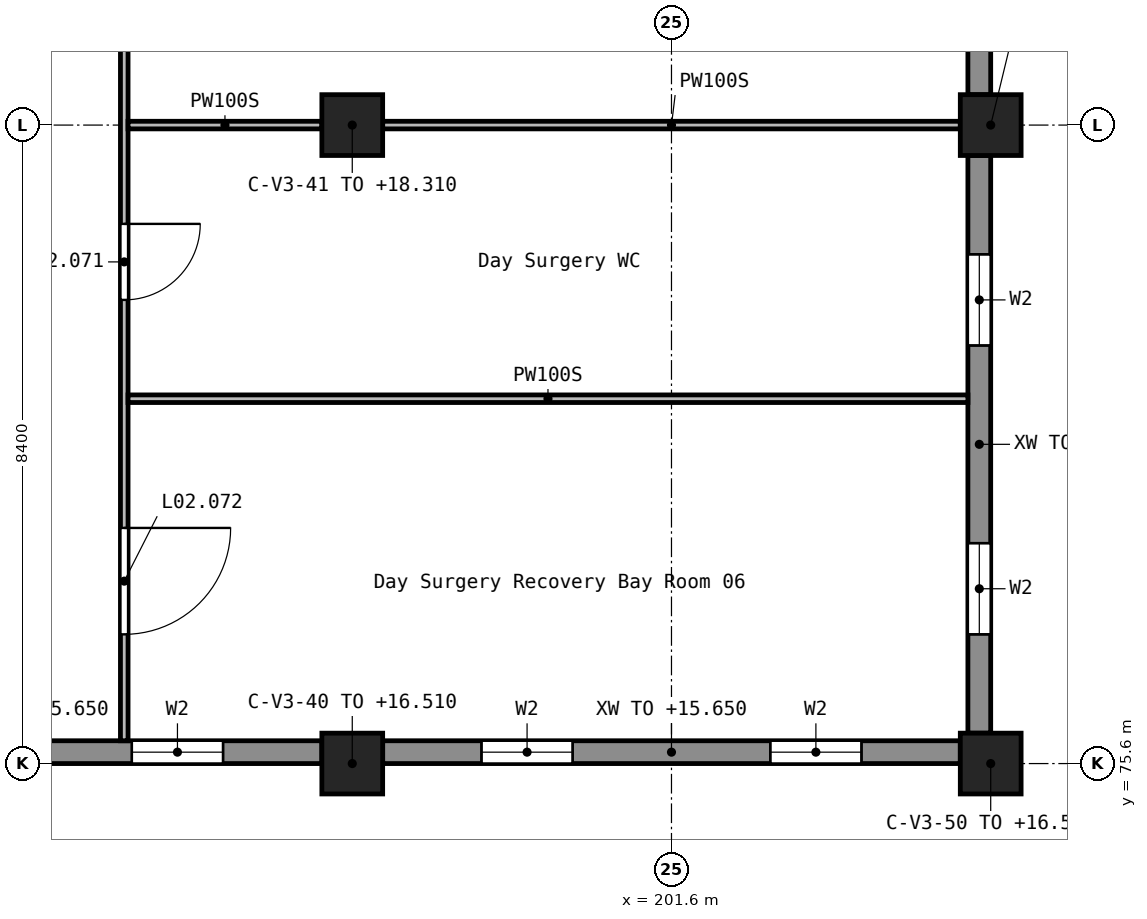
"""IFC4 building model, lengths in metres.
Left out: names, types, materials, properties, quantities, classifications, styles, units other than length and angle.
Written with IfcOpenShell. Run it as: python <this file> out.ifc"""

import sys

from ifc_helpers import new_model, si_unit, direction, frame, frame_2d, origin, origin_2d, place, context, subcontext, project, spatial, rectangle, extrude, element, fill, save


model = new_model("IFC4")
c1 = context("Model", 3, precision=1e-05, world=origin(), true_north=direction((0.0, 1.0)))
c2 = subcontext(c1, "Body", "Model", "MODEL_VIEW")
j1 = project(units=[si_unit("LENGTHUNIT", "METRE"), si_unit("PLANEANGLEUNIT", "RADIAN")], contexts=[c1])
p1 = place(None, origin())
s1 = spatial("IfcSite", under=j1, at=p1, CompositionType="ELEMENT")
p2 = place(p1, origin())
s2 = spatial("IfcBuilding", under=s1, at=p2, CompositionType="ELEMENT")
p3 = place(p2, frame((0.0, 0.0, 12.6)))
s3 = spatial("IfcBuildingStorey", under=s2, at=p3, CompositionType="ELEMENT", Elevation=12.6)
p4 = place(p3, frame((197.4, 75.6, 0.0), z_axis=(0.0, 0.0, 1.0), x_axis=(1.0, 0.0, 0.0)))
e1 = element("IfcColumn", 1, at=p4, inside=s3, PredefinedType="COLUMN", context=c2, shape_type="SweptSolid", body=[
    extrude(rectangle(XDim=0.8, YDim=0.8, at=origin_2d()), origin(), (0.0, 0.0, 1.0), 3.91),
])
p5 = place(p3, frame((197.4, 84.0, 0.0), z_axis=(0.0, 0.0, 1.0), x_axis=(1.0, 0.0, 0.0)))
e2 = element("IfcColumn", 2, at=p5, inside=s3, PredefinedType="COLUMN", context=c2, shape_type="SweptSolid", body=[
    extrude(rectangle(XDim=0.8, YDim=0.8, at=origin_2d()), origin(), (0.0, 0.0, 1.0), 5.71),
])
p6 = place(p3, frame((205.8, 75.6, 0.0), z_axis=(0.0, 0.0, 1.0), x_axis=(1.0, 0.0, 0.0)))
e3 = element("IfcColumn", 3, at=p6, inside=s3, PredefinedType="COLUMN", context=c2, shape_type="SweptSolid", body=[
    extrude(rectangle(XDim=0.8, YDim=0.8, at=origin_2d()), origin(), (0.0, 0.0, 1.0), 3.91),
])
p7 = place(p3, frame((205.8, 84.0, 0.0), z_axis=(0.0, 0.0, 1.0), x_axis=(1.0, 0.0, 0.0)))
e4 = element("IfcColumn", 4, at=p7, inside=s3, PredefinedType="COLUMN", context=c2, shape_type="SweptSolid", body=[
    extrude(rectangle(XDim=0.8, YDim=0.8, at=origin_2d()), origin(), (0.0, 0.0, 1.0), 5.71),
])
p8 = place(p3, frame((189.4, 75.75, 0.0), z_axis=(0.0, 0.0, 1.0), x_axis=(1.0, 0.0, 0.0)))
e5 = element("IfcWall", 5, at=p8, inside=s3, PredefinedType="STANDARD", context=c2, shape_type="SweptSolid", body=[
    extrude(rectangle(XDim=7.6, YDim=0.3, at=frame_2d((3.8, 0.0))), origin(), (0.0, 0.0, 1.0), 3.05),
])
p9 = place(p8, frame((0.65, 0.0, 1.2)))
e6 = element("IfcOpeningElement", 6, at=p9, cuts=e5, PredefinedType="OPENING", context=c2, shape_type="SweptSolid", body=[
    extrude(rectangle(XDim=1.2, YDim=1.2, at=frame_2d((0.6, 0.6))), frame((0.0, 0.16, 0.0), z_axis=(0.0, -1.0, 0.0), x_axis=(1.0, 0.0, 0.0)), (0.0, 0.0, 1.0), 0.32),
])
p10 = place(p8, frame((5.1, 0.0, 1.2)))
e7 = element("IfcOpeningElement", 7, at=p10, cuts=e5, PredefinedType="OPENING", context=c2, shape_type="SweptSolid", body=[
    extrude(rectangle(XDim=1.2, YDim=1.2, at=frame_2d((0.6, 0.6))), frame((0.0, 0.16, 0.0), z_axis=(0.0, -1.0, 0.0), x_axis=(1.0, 0.0, 0.0)), (0.0, 0.0, 1.0), 0.32),
])
p11 = place(p3, frame((197.8, 75.75, 0.0), z_axis=(0.0, 0.0, 1.0), x_axis=(1.0, 0.0, 0.0)))
e8 = element("IfcWall", 8, at=p11, inside=s3, PredefinedType="STANDARD", context=c2, shape_type="SweptSolid", body=[
    extrude(rectangle(XDim=7.6, YDim=0.3, at=frame_2d((3.8, 0.0))), origin(), (0.0, 0.0, 1.0), 3.05),
])
p12 = place(p11, frame((1.3, 0.0, 1.2)))
e9 = element("IfcOpeningElement", 9, at=p12, cuts=e8, PredefinedType="OPENING", context=c2, shape_type="SweptSolid", body=[
    extrude(rectangle(XDim=1.2, YDim=1.2, at=frame_2d((0.6, 0.6))), frame((0.0, 0.16, 0.0), z_axis=(0.0, -1.0, 0.0), x_axis=(1.0, 0.0, 0.0)), (0.0, 0.0, 1.0), 0.32),
])
p13 = place(p11, frame((5.1, 0.0, 1.2)))
e10 = element("IfcOpeningElement", 10, at=p13, cuts=e8, PredefinedType="OPENING", context=c2, shape_type="SweptSolid", body=[
    extrude(rectangle(XDim=1.2, YDim=1.2, at=frame_2d((0.6, 0.6))), frame((0.0, 0.16, 0.0), z_axis=(0.0, -1.0, 0.0), x_axis=(1.0, 0.0, 0.0)), (0.0, 0.0, 1.0), 0.32),
])
p14 = place(p3, frame((205.65, 76.0, 0.0), z_axis=(0.0, 0.0, 1.0), x_axis=(0.0, 1.0, 0.0)))
e11 = element("IfcWall", 11, at=p14, inside=s3, PredefinedType="STANDARD", context=c2, shape_type="SweptSolid", body=[
    extrude(rectangle(XDim=7.6, YDim=0.3, at=frame_2d((3.8, 0.0))), origin(), (0.0, 0.0, 1.0), 3.05),
])
p15 = place(p14, frame((1.3, 0.0, 1.2)))
e12 = element("IfcOpeningElement", 12, at=p15, cuts=e11, PredefinedType="OPENING", context=c2, shape_type="SweptSolid", body=[
    extrude(rectangle(XDim=1.2, YDim=1.2, at=frame_2d((0.6, 0.6))), frame((0.0, 0.16, 0.0), z_axis=(0.0, -1.0, 0.0), x_axis=(1.0, 0.0, 0.0)), (0.0, 0.0, 1.0), 0.32),
])
p16 = place(p14, frame((5.1, 0.0, 1.2)))
e13 = element("IfcOpeningElement", 13, at=p16, cuts=e11, PredefinedType="OPENING", context=c2, shape_type="SweptSolid", body=[
    extrude(rectangle(XDim=1.2, YDim=1.2, at=frame_2d((0.6, 0.6))), frame((0.0, 0.16, 0.0), z_axis=(0.0, -1.0, 0.0), x_axis=(1.0, 0.0, 0.0)), (0.0, 0.0, 1.0), 0.32),
])
p17 = place(p3, frame((205.65, 84.4, 0.0), z_axis=(0.0, 0.0, 1.0), x_axis=(0.0, 1.0, 0.0)))
e14 = element("IfcWall", 14, at=p17, inside=s3, PredefinedType="STANDARD", context=c2, shape_type="SweptSolid", body=[
    extrude(rectangle(XDim=7.6, YDim=0.3, at=frame_2d((3.8, 0.0))), origin(), (0.0, 0.0, 1.0), 3.05),
])
p18 = place(p17, frame((1.3, 0.0, 1.2)))
e15 = element("IfcOpeningElement", 15, at=p18, cuts=e14, PredefinedType="OPENING", context=c2, shape_type="SweptSolid", body=[
    extrude(rectangle(XDim=1.2, YDim=1.2, at=frame_2d((0.6, 0.6))), frame((0.0, 0.16, 0.0), z_axis=(0.0, -1.0, 0.0), x_axis=(1.0, 0.0, 0.0)), (0.0, 0.0, 1.0), 0.32),
])
p19 = place(p17, frame((5.1, 0.0, 1.2)))
e16 = element("IfcOpeningElement", 16, at=p19, cuts=e14, PredefinedType="OPENING", context=c2, shape_type="SweptSolid", body=[
    extrude(rectangle(XDim=1.2, YDim=1.2, at=frame_2d((0.6, 0.6))), frame((0.0, 0.16, 0.0), z_axis=(0.0, -1.0, 0.0), x_axis=(1.0, 0.0, 0.0)), (0.0, 0.0, 1.0), 0.32),
])
p20 = place(p3, frame((194.4, 94.25, 0.0), z_axis=(0.0, 0.0, 1.0), x_axis=(0.0, -1.0, 0.0)))
e17 = element("IfcWall", 17, at=p20, inside=s3, PredefinedType="PARTITIONING", context=c2, shape_type="SweptSolid", body=[
    extrude(rectangle(XDim=18.35, YDim=0.1, at=frame_2d((9.175, 0.0))), origin(), (0.0, 0.0, 1.0), 3.79),
])
p21 = place(p20, frame((0.5, 0.0, 0.0)))
e18 = element("IfcOpeningElement", 18, at=p21, cuts=e17, PredefinedType="OPENING", context=c2, shape_type="SweptSolid", body=[
    extrude(rectangle(XDim=0.9, YDim=2.1, at=frame_2d((0.45, 1.05))), frame((0.0, 0.06, 0.0), z_axis=(0.0, -1.0, 0.0), x_axis=(1.0, 0.0, 0.0)), (0.0, 0.0, 1.0), 0.12),
])
p22 = place(p20, frame((3.25, 0.0, 0.0)))
e19 = element("IfcOpeningElement", 19, at=p22, cuts=e17, PredefinedType="OPENING", context=c2, shape_type="SweptSolid", body=[
    extrude(rectangle(XDim=1.4, YDim=2.1, at=frame_2d((0.7, 1.05))), frame((0.0, 0.06, 0.0), z_axis=(0.0, -1.0, 0.0), x_axis=(1.0, 0.0, 0.0)), (0.0, 0.0, 1.0), 0.12),
])
p23 = place(p20, frame((7.7, 0.0, 0.0)))
e20 = element("IfcOpeningElement", 20, at=p23, cuts=e17, PredefinedType="OPENING", context=c2, shape_type="SweptSolid", body=[
    extrude(rectangle(XDim=0.9, YDim=2.1, at=frame_2d((0.45, 1.05))), frame((0.0, 0.06, 0.0), z_axis=(0.0, -1.0, 0.0), x_axis=(1.0, 0.0, 0.0)), (0.0, 0.0, 1.0), 0.12),
])
p24 = place(p20, frame((11.55, 0.0, 0.0)))
e21 = element("IfcOpeningElement", 21, at=p24, cuts=e17, PredefinedType="OPENING", context=c2, shape_type="SweptSolid", body=[
    extrude(rectangle(XDim=1.0, YDim=2.1, at=frame_2d((0.5, 1.05))), frame((0.0, 0.06, 0.0), z_axis=(0.0, -1.0, 0.0), x_axis=(1.0, 0.0, 0.0)), (0.0, 0.0, 1.0), 0.12),
])
p25 = place(p20, frame((15.55, 0.0, 0.0)))
e22 = element("IfcOpeningElement", 22, at=p25, cuts=e17, PredefinedType="OPENING", context=c2, shape_type="SweptSolid", body=[
    extrude(rectangle(XDim=1.4, YDim=2.1, at=frame_2d((0.7, 1.05))), frame((0.0, 0.06, 0.0), z_axis=(0.0, -1.0, 0.0), x_axis=(1.0, 0.0, 0.0)), (0.0, 0.0, 1.0), 0.12),
])
p26 = place(p3, frame((194.45, 80.4, 0.0), z_axis=(0.0, 0.0, 1.0), x_axis=(1.0, 0.0, 0.0)))
e23 = element("IfcWall", 23, at=p26, inside=s3, PredefinedType="PARTITIONING", context=c2, shape_type="SweptSolid", body=[
    extrude(rectangle(XDim=11.05, YDim=0.1, at=frame_2d((5.525, 0.0))), origin(), (0.0, 0.0, 1.0), 3.85),
])
p27 = place(p3, frame((194.45, 84.0, 0.0), z_axis=(0.0, 0.0, 1.0), x_axis=(1.0, 0.0, 0.0)))
e24 = element("IfcWall", 24, at=p27, inside=s3, PredefinedType="PARTITIONING", context=c2, shape_type="SweptSolid", body=[
    extrude(rectangle(XDim=2.55, YDim=0.1, at=frame_2d((1.275, 0.0))), origin(), (0.0, 0.0, 1.0), 3.85),
])
p28 = place(p3, frame((197.8, 84.0, 0.0), z_axis=(0.0, 0.0, 1.0), x_axis=(1.0, 0.0, 0.0)))
e25 = element("IfcWall", 25, at=p28, inside=s3, PredefinedType="PARTITIONING", context=c2, shape_type="SweptSolid", body=[
    extrude(rectangle(XDim=7.6, YDim=0.1, at=frame_2d((3.8, 0.0))), origin(), (0.0, 0.0, 1.0), 3.85),
])
p29 = place(p10, origin())
e26 = element("IfcWindow", 26, at=p29, inside=s3, PartitioningType="SINGLE_PANEL", PredefinedType="WINDOW", context=c2, shape_type="SweptSolid", body=[
    extrude(rectangle(XDim=1.2, YDim=1.2, at=frame_2d((0.6, 0.6))), frame((0.0, 0.03, 0.0), z_axis=(0.0, -1.0, 0.0), x_axis=(1.0, 0.0, 0.0)), (0.0, 0.0, 1.0), 0.06),
])
fill(e7, e26)
p30 = place(p12, origin())
e27 = element("IfcWindow", 27, at=p30, inside=s3, PartitioningType="SINGLE_PANEL", PredefinedType="WINDOW", context=c2, shape_type="SweptSolid", body=[
    extrude(rectangle(XDim=1.2, YDim=1.2, at=frame_2d((0.6, 0.6))), frame((0.0, 0.03, 0.0), z_axis=(0.0, -1.0, 0.0), x_axis=(1.0, 0.0, 0.0)), (0.0, 0.0, 1.0), 0.06),
])
fill(e9, e27)
p31 = place(p13, origin())
e28 = element("IfcWindow", 28, at=p31, inside=s3, PartitioningType="SINGLE_PANEL", PredefinedType="WINDOW", context=c2, shape_type="SweptSolid", body=[
    extrude(rectangle(XDim=1.2, YDim=1.2, at=frame_2d((0.6, 0.6))), frame((0.0, 0.03, 0.0), z_axis=(0.0, -1.0, 0.0), x_axis=(1.0, 0.0, 0.0)), (0.0, 0.0, 1.0), 0.06),
])
fill(e10, e28)
p32 = place(p15, origin())
e29 = element("IfcWindow", 29, at=p32, inside=s3, PartitioningType="SINGLE_PANEL", PredefinedType="WINDOW", context=c2, shape_type="SweptSolid", body=[
    extrude(rectangle(XDim=1.2, YDim=1.2, at=frame_2d((0.6, 0.6))), frame((0.0, 0.03, 0.0), z_axis=(0.0, -1.0, 0.0), x_axis=(1.0, 0.0, 0.0)), (0.0, 0.0, 1.0), 0.06),
])
fill(e12, e29)
p33 = place(p16, origin())
e30 = element("IfcWindow", 30, at=p33, inside=s3, PartitioningType="SINGLE_PANEL", PredefinedType="WINDOW", context=c2, shape_type="SweptSolid", body=[
    extrude(rectangle(XDim=1.2, YDim=1.2, at=frame_2d((0.6, 0.6))), frame((0.0, 0.03, 0.0), z_axis=(0.0, -1.0, 0.0), x_axis=(1.0, 0.0, 0.0)), (0.0, 0.0, 1.0), 0.06),
])
fill(e13, e30)
p34 = place(p24, origin())
e31 = element("IfcDoor", 31, at=p34, inside=s3, OperationType="SINGLE_SWING_RIGHT", PredefinedType="DOOR", context=c2, shape_type="SweptSolid", body=[
    extrude(rectangle(XDim=1.0, YDim=2.1, at=frame_2d((0.5, 1.05))), frame((0.0, 0.025, 0.0), z_axis=(0.0, -1.0, 0.0), x_axis=(1.0, 0.0, 0.0)), (0.0, 0.0, 1.0), 0.05),
])
fill(e21, e31)
p35 = place(p25, origin())
e32 = element("IfcDoor", 32, at=p35, inside=s3, OperationType="DOUBLE_DOOR_SINGLE_SWING", PredefinedType="DOOR", context=c2, shape_type="SweptSolid", body=[
    extrude(rectangle(XDim=1.4, YDim=2.1, at=frame_2d((0.7, 1.05))), frame((0.0, 0.025, 0.0), z_axis=(0.0, -1.0, 0.0), x_axis=(1.0, 0.0, 0.0)), (0.0, 0.0, 1.0), 0.05),
])
fill(e22, e32)
save(model, sys.argv[1])
